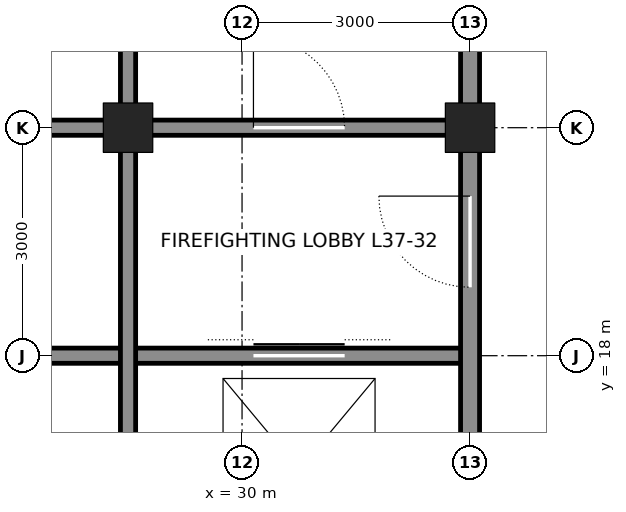
"""IFC4 building model, lengths in metres.
Left out: names, types, materials, properties, quantities, classifications, styles, units other than length and angle.
Written with IfcOpenShell. Run it as: python <this file> out.ifc"""

import sys

from ifc_helpers import new_model, si_unit, direction, frame, frame_2d, origin, origin_2d, place, context, subcontext, project, spatial, rectangle, hollow_rectangle, extrude, element, fill, save


model = new_model("IFC4")
c1 = context("Model", 3, precision=1e-05, world=origin(), true_north=direction((0.0, 1.0)))
c2 = subcontext(c1, "Body", "Model", "MODEL_VIEW")
j1 = project(units=[si_unit("LENGTHUNIT", "METRE"), si_unit("PLANEANGLEUNIT", "RADIAN")], contexts=[c1])
p1 = place(None, origin())
s1 = spatial("IfcSite", under=j1, at=p1, CompositionType="ELEMENT")
p2 = place(p1, origin())
s2 = spatial("IfcBuilding", under=s1, at=p2, CompositionType="ELEMENT")
p3 = place(p2, frame((0.0, 0.0, 169.8)))
s3 = spatial("IfcBuildingStorey", under=s2, at=p3, CompositionType="ELEMENT", Elevation=169.8)
for number, where, z_axis, x_axis in (
    (1, (33.0, 21.0, 0.0), (0.0, 0.0, 1.0), (1.0, 0.0, 0.0)),
    (2, (28.5, 21.0, 0.0), (0.0, 0.0, 1.0), (1.0, 0.0, 0.0)),
):
    element("IfcColumn", number, at=place(p3, frame(where, z_axis=z_axis, x_axis=x_axis)), inside=s3, PredefinedType="COLUMN", context=c2, shape_type="SweptSolid", body=[
        extrude(hollow_rectangle(XDim=0.65, YDim=0.65, WallThickness=0.065, at=origin_2d()), origin(), (0.0, 0.0, 1.0), 4.2),
    ])
p4 = place(p3, frame((25.5, 18.0, 0.0), z_axis=(0.0, 0.0, 1.0), x_axis=(1.0, 0.0, 0.0)))
e3 = element("IfcWall", 3, at=p4, inside=s3, PredefinedType="SOLIDWALL", context=c2, shape_type="SweptSolid", body=[
    extrude(rectangle(XDim=7.5, YDim=0.2, at=frame_2d((3.75, 0.0))), origin(), (0.0, 0.0, 1.0), 4.04),
])
p5 = place(p4, frame((4.65, 0.0, 0.0)))
e4 = element("IfcOpeningElement", 4, at=p5, cuts=e3, PredefinedType="OPENING", context=c2, shape_type="SweptSolid", body=[
    extrude(rectangle(XDim=1.2, YDim=2.1, at=frame_2d((0.6, 1.05))), frame((0.0, 0.11, 0.0), z_axis=(0.0, -1.0, 0.0), x_axis=(1.0, 0.0, 0.0)), (0.0, 0.0, 1.0), 0.22),
])
p6 = place(p3, frame((25.5, 21.0, 0.0), z_axis=(0.0, 0.0, 1.0), x_axis=(1.0, 0.0, 0.0)))
e5 = element("IfcWall", 5, at=p6, inside=s3, PredefinedType="SOLIDWALL", context=c2, shape_type="SweptSolid", body=[
    extrude(rectangle(XDim=2.75, YDim=0.2, at=frame_2d((1.375, 0.0))), origin(), (0.0, 0.0, 1.0), 3.09),
])
p7 = place(p3, frame((28.75, 21.0, 0.0), z_axis=(0.0, 0.0, 1.0), x_axis=(1.0, 0.0, 0.0)))
e6 = element("IfcWall", 6, at=p7, inside=s3, PredefinedType="SOLIDWALL", context=c2, shape_type="SweptSolid", body=[
    extrude(rectangle(XDim=4.0, YDim=0.2, at=frame_2d((2.0, 0.0))), origin(), (0.0, 0.0, 1.0), 3.09),
])
p8 = place(p7, frame((1.4, 0.0, 0.0)))
e7 = element("IfcOpeningElement", 7, at=p8, cuts=e6, PredefinedType="OPENING", context=c2, shape_type="SweptSolid", body=[
    extrude(rectangle(XDim=1.2, YDim=2.1, at=frame_2d((0.6, 1.05))), frame((0.0, 0.11, 0.0), z_axis=(0.0, -1.0, 0.0), x_axis=(1.0, 0.0, 0.0)), (0.0, 0.0, 1.0), 0.22),
])
p9 = place(p3, frame((28.5, 12.25, 0.0), z_axis=(0.0, 0.0, 1.0), x_axis=(0.0, 1.0, 0.0)))
e8 = element("IfcWall", 8, at=p9, inside=s3, PredefinedType="SOLIDWALL", context=c2, shape_type="SweptSolid", body=[
    extrude(rectangle(XDim=8.5, YDim=0.2, at=frame_2d((4.25, 0.0))), origin(), (0.0, 0.0, 1.0), 3.113),
])
p10 = place(p3, frame((28.5, 21.25, 0.0), z_axis=(0.0, 0.0, 1.0), x_axis=(0.0, 1.0, 0.0)))
e9 = element("IfcWall", 9, at=p10, inside=s3, PredefinedType="SOLIDWALL", context=c2, shape_type="SweptSolid", body=[
    extrude(rectangle(XDim=2.5, YDim=0.2, at=frame_2d((1.25, 0.0))), origin(), (0.0, 0.0, 1.0), 3.113),
])
p11 = place(p3, frame((33.0, 12.25, 0.0), z_axis=(0.0, 0.0, 1.0), x_axis=(0.0, 1.0, 0.0)))
e10 = element("IfcWall", 10, at=p11, inside=s3, PredefinedType="SOLIDWALL", context=c2, shape_type="SweptSolid", body=[
    extrude(rectangle(XDim=8.5, YDim=0.25, at=frame_2d((4.25, 0.0))), origin(), (0.0, 0.0, 1.0), 3.113),
])
p12 = place(p11, frame((6.65, 0.0, 0.0)))
e11 = element("IfcOpeningElement", 11, at=p12, cuts=e10, PredefinedType="OPENING", context=c2, shape_type="SweptSolid", body=[
    extrude(rectangle(XDim=1.2, YDim=2.1, at=frame_2d((0.6, 1.05))), frame((0.0, 0.135, 0.0), z_axis=(0.0, -1.0, 0.0), x_axis=(1.0, 0.0, 0.0)), (0.0, 0.0, 1.0), 0.27),
])
p13 = place(p11, frame((0.875, 0.0, 0.0)))
e12 = element("IfcOpeningElement", 12, at=p13, cuts=e10, PredefinedType="OPENING", context=c2, shape_type="SweptSolid", body=[
    extrude(rectangle(XDim=0.75, YDim=2.1, at=frame_2d((0.375, 1.05))), frame((0.0, 0.135, 0.0), z_axis=(0.0, -1.0, 0.0), x_axis=(1.0, 0.0, 0.0)), (0.0, 0.0, 1.0), 0.27),
])
p14 = place(p3, frame((33.0, 21.25, 0.0), z_axis=(0.0, 0.0, 1.0), x_axis=(0.0, 1.0, 0.0)))
e13 = element("IfcWall", 13, at=p14, inside=s3, PredefinedType="SOLIDWALL", context=c2, shape_type="SweptSolid", body=[
    extrude(rectangle(XDim=2.5, YDim=0.25, at=frame_2d((1.25, 0.0))), origin(), (0.0, 0.0, 1.0), 3.113),
])
p15 = place(p8, origin())
e14 = element("IfcDoor", 14, at=p15, inside=s3, OperationType="SINGLE_SWING_LEFT", PredefinedType="DOOR", context=c2, shape_type="SweptSolid", body=[
    extrude(rectangle(XDim=1.2, YDim=2.1, at=frame_2d((0.6, 1.05))), frame((0.0, 0.025, 0.0), z_axis=(0.0, -1.0, 0.0), x_axis=(1.0, 0.0, 0.0)), (0.0, 0.0, 1.0), 0.05),
])
fill(e7, e14)
p16 = place(p12, origin())
e15 = element("IfcDoor", 15, at=p16, inside=s3, OperationType="SINGLE_SWING_RIGHT", PredefinedType="DOOR", context=c2, shape_type="SweptSolid", body=[
    extrude(rectangle(XDim=1.2, YDim=2.1, at=frame_2d((0.6, 1.05))), frame((0.0, 0.025, 0.0), z_axis=(0.0, -1.0, 0.0), x_axis=(1.0, 0.0, 0.0)), (0.0, 0.0, 1.0), 0.05),
])
fill(e11, e15)
p17 = place(p5, origin())
e16 = element("IfcDoor", 16, at=p17, inside=s3, OperationType="DOUBLE_DOOR_SLIDING", PredefinedType="DOOR", context=c2, shape_type="SweptSolid", body=[
    extrude(rectangle(XDim=1.2, YDim=2.1, at=frame_2d((0.6, 1.05))), frame((0.0, 0.025, 0.0), z_axis=(0.0, -1.0, 0.0), x_axis=(1.0, 0.0, 0.0)), (0.0, 0.0, 1.0), 0.05),
])
fill(e4, e16)
save(model, sys.argv[1])
